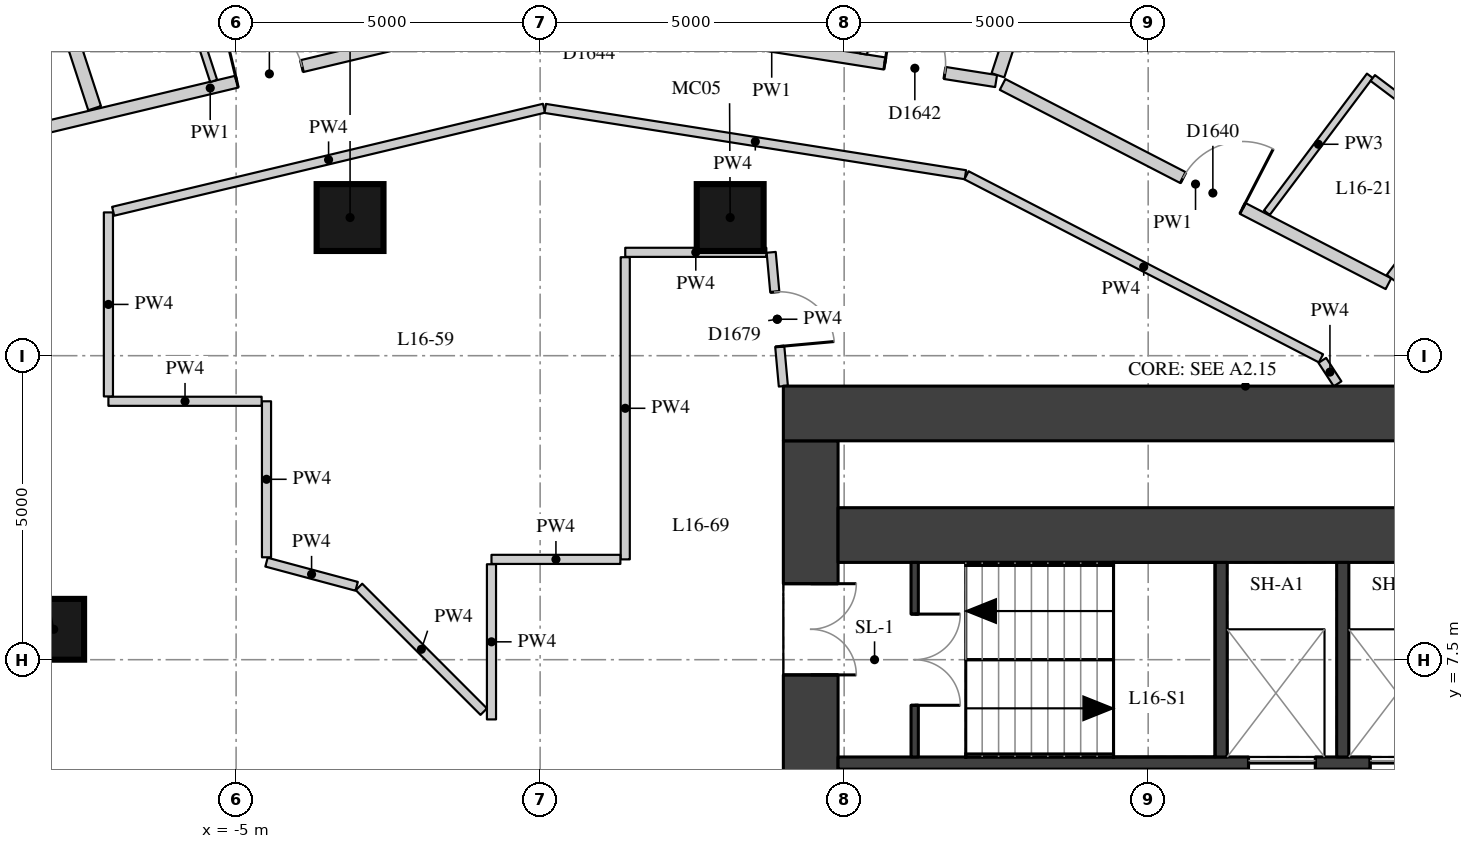
"""IFC4 building model, lengths in metres.
Left out: names, types, materials, properties, quantities, classifications, styles, units other than length and angle.
Written with IfcOpenShell. Run it as: python <this file> out.ifc"""

import sys

from ifc_helpers import new_model, si_unit, direction, frame, frame_2d, origin, origin_2d, place, context, subcontext, project, spatial, rectangle, extrude, element, fill, save


model = new_model("IFC4")
c1 = context("Model", 3, precision=1e-05, world=origin(), true_north=direction((0.0, 1.0)))
c2 = subcontext(c1, "Body", "Model", "MODEL_VIEW")
j1 = project(units=[si_unit("LENGTHUNIT", "METRE"), si_unit("PLANEANGLEUNIT", "RADIAN")], contexts=[c1])
p1 = place(None, origin())
s1 = spatial("IfcSite", under=j1, at=p1, CompositionType="ELEMENT")
p2 = place(p1, origin())
s2 = spatial("IfcBuilding", under=s1, at=p2, CompositionType="ELEMENT")
p3 = place(p2, frame((0.0, 0.0, 61.3)))
s3 = spatial("IfcBuildingStorey", under=s2, at=p3, CompositionType="ELEMENT", Elevation=61.3)
p4 = place(p3, frame((-8.0, 8.0, 0.0), z_axis=(0.0, 0.0, 1.0), x_axis=(1.0, 0.0, 0.0)))
e1 = element("IfcColumn", 1, at=p4, inside=s3, PredefinedType="COLUMN", context=c2, shape_type="SweptSolid", body=[
    extrude(rectangle(XDim=1.0, YDim=1.0, at=origin_2d()), origin(), (0.0, 0.0, 1.0), 3.3),
])
for number, where, z_axis, x_axis in (
    (2, (3.126, 14.772, 0.0), (0.0, 0.0, 1.0), (1.0, 0.0, 0.0)),
    (3, (-3.126, 14.772, 0.0), (0.0, 0.0, 1.0), (1.0, 0.0, 0.0)),
):
    element("IfcColumn", number, at=place(p3, frame(where, z_axis=z_axis, x_axis=x_axis)), inside=s3, PredefinedType="COLUMN", context=c2, shape_type="SweptSolid", body=[
        extrude(rectangle(XDim=1.1, YDim=1.1, at=origin_2d()), origin(), (0.0, 0.0, 1.0), 3.3),
    ])
p5 = place(p3, frame((4.45, -11.1, 0.0), z_axis=(0.0, 0.0, 1.0), x_axis=(0.0, 1.0, 0.0)))
e4 = element("IfcWall", 4, at=p5, inside=s3, PredefinedType="SHEAR", context=c2, shape_type="SweptSolid", body=[
    extrude(rectangle(XDim=22.2, YDim=0.9, at=frame_2d((11.1, 0.0))), origin(), (0.0, 0.0, 1.0), 3.02),
])
p6 = place(p5, frame((2.35, 0.0, 0.0)))
e5 = element("IfcOpeningElement", 5, at=p6, cuts=e4, PredefinedType="OPENING", context=c2, shape_type="SweptSolid", body=[
    extrude(rectangle(XDim=1.5, YDim=2.1, at=frame_2d((0.75, 1.05))), frame((0.0, 0.46, 0.0), z_axis=(0.0, -1.0, 0.0), x_axis=(1.0, 0.0, 0.0)), (0.0, 0.0, 1.0), 0.92),
])
p7 = place(p5, frame((5.45, 0.0, 0.0)))
e6 = element("IfcOpeningElement", 6, at=p7, cuts=e4, PredefinedType="OPENING", context=c2, shape_type="SweptSolid", body=[
    extrude(rectangle(XDim=1.8, YDim=2.1, at=frame_2d((0.9, 1.05))), frame((0.0, 0.46, 0.0), z_axis=(0.0, -1.0, 0.0), x_axis=(1.0, 0.0, 0.0)), (0.0, 0.0, 1.0), 0.92),
])
p8 = place(p5, frame((7.95, 0.0, 0.0)))
e7 = element("IfcOpeningElement", 7, at=p8, cuts=e4, PredefinedType="OPENING", context=c2, shape_type="SweptSolid", body=[
    extrude(rectangle(XDim=1.1, YDim=2.1, at=frame_2d((0.55, 1.05))), frame((0.0, 0.46, 0.0), z_axis=(0.0, -1.0, 0.0), x_axis=(1.0, 0.0, 0.0)), (0.0, 0.0, 1.0), 0.92),
])
p9 = place(p5, frame((10.6, 0.0, 0.0)))
e8 = element("IfcOpeningElement", 8, at=p9, cuts=e4, PredefinedType="OPENING", context=c2, shape_type="SweptSolid", body=[
    extrude(rectangle(XDim=1.0, YDim=2.1, at=frame_2d((0.5, 1.05))), frame((0.0, 0.46, 0.0), z_axis=(0.0, -1.0, 0.0), x_axis=(1.0, 0.0, 0.0)), (0.0, 0.0, 1.0), 0.92),
])
p10 = place(p5, frame((13.15, 0.0, 0.0)))
e9 = element("IfcOpeningElement", 9, at=p10, cuts=e4, PredefinedType="OPENING", context=c2, shape_type="SweptSolid", body=[
    extrude(rectangle(XDim=1.1, YDim=2.1, at=frame_2d((0.55, 1.05))), frame((0.0, 0.46, 0.0), z_axis=(0.0, -1.0, 0.0), x_axis=(1.0, 0.0, 0.0)), (0.0, 0.0, 1.0), 0.92),
])
p11 = place(p5, frame((14.95, 0.0, 0.0)))
e10 = element("IfcOpeningElement", 10, at=p11, cuts=e4, PredefinedType="OPENING", context=c2, shape_type="SweptSolid", body=[
    extrude(rectangle(XDim=1.8, YDim=2.1, at=frame_2d((0.9, 1.05))), frame((0.0, 0.46, 0.0), z_axis=(0.0, -1.0, 0.0), x_axis=(1.0, 0.0, 0.0)), (0.0, 0.0, 1.0), 0.92),
])
p12 = place(p5, frame((18.35, 0.0, 0.0)))
e11 = element("IfcOpeningElement", 11, at=p12, cuts=e4, PredefinedType="OPENING", context=c2, shape_type="SweptSolid", body=[
    extrude(rectangle(XDim=1.5, YDim=2.1, at=frame_2d((0.75, 1.05))), frame((0.0, 0.46, 0.0), z_axis=(0.0, -1.0, 0.0), x_axis=(1.0, 0.0, 0.0)), (0.0, 0.0, 1.0), 0.92),
])
p13 = place(p3, frame((4.0, 11.55, 0.0), z_axis=(0.0, 0.0, 1.0), x_axis=(1.0, 0.0, 0.0)))
e12 = element("IfcWall", 12, at=p13, inside=s3, PredefinedType="SHEAR", context=c2, shape_type="SweptSolid", body=[
    extrude(rectangle(XDim=15.2, YDim=0.9, at=frame_2d((7.6, 0.0))), origin(), (0.0, 0.0, 1.0), 3.02),
])
p14 = place(p3, frame((4.9, 9.55, 0.0), z_axis=(0.0, 0.0, 1.0), x_axis=(1.0, 0.0, 0.0)))
e13 = element("IfcWall", 13, at=p14, inside=s3, PredefinedType="SHEAR", context=c2, shape_type="SweptSolid", body=[
    extrude(rectangle(XDim=10.2, YDim=0.9, at=frame_2d((5.1, 0.0))), origin(), (0.0, 0.0, 1.0), 3.02),
])
p15 = place(p3, frame((4.9, 5.8, 0.0), z_axis=(0.0, 0.0, 1.0), x_axis=(1.0, 0.0, 0.0)))
e14 = element("IfcWall", 14, at=p15, inside=s3, PredefinedType="SHEAR", context=c2, shape_type="SweptSolid", body=[
    extrude(rectangle(XDim=10.2, YDim=0.2, at=frame_2d((5.1, 0.0))), origin(), (0.0, 0.0, 1.0), 3.02),
])
p16 = place(p15, frame((6.75, 0.0, 0.0)))
e15 = element("IfcOpeningElement", 15, at=p16, cuts=e14, PredefinedType="OPENING", context=c2, shape_type="SweptSolid", body=[
    extrude(rectangle(XDim=1.1, YDim=2.1, at=frame_2d((0.55, 1.05))), frame((0.0, 0.11, 0.0), z_axis=(0.0, -1.0, 0.0), x_axis=(1.0, 0.0, 0.0)), (0.0, 0.0, 1.0), 0.22),
])
p17 = place(p15, frame((8.75, 0.0, 0.0)))
e16 = element("IfcOpeningElement", 16, at=p17, cuts=e14, PredefinedType="OPENING", context=c2, shape_type="SweptSolid", body=[
    extrude(rectangle(XDim=1.1, YDim=2.1, at=frame_2d((0.55, 1.05))), frame((0.0, 0.11, 0.0), z_axis=(0.0, -1.0, 0.0), x_axis=(1.0, 0.0, 0.0)), (0.0, 0.0, 1.0), 0.22),
])
for number, where, z_axis, x_axis in (
    (17, (11.2, 5.9, 0.0), (0.0, 0.0, 1.0), (0.0, 1.0, 0.0)),
    (18, (13.2, 5.9, 0.0), (0.0, 0.0, 1.0), (0.0, 1.0, 0.0)),
):
    element("IfcWall", number, at=place(p3, frame(where, z_axis=z_axis, x_axis=x_axis)), inside=s3, PredefinedType="SHEAR", context=c2, shape_type="SweptSolid", body=[
        extrude(rectangle(XDim=3.2, YDim=0.2, at=frame_2d((1.6, 0.0))), origin(), (0.0, 0.0, 1.0), 3.02),
    ])
p18 = place(p3, frame((6.16, 5.9, 0.0), z_axis=(0.0, 0.0, 1.0), x_axis=(0.0, 1.0, 0.0)))
e19 = element("IfcWall", 19, at=p18, inside=s3, PredefinedType="SHEAR", context=c2, shape_type="SweptSolid", body=[
    extrude(rectangle(XDim=3.2, YDim=0.12, at=frame_2d((1.6, 0.0))), origin(), (0.0, 0.0, 1.0), 3.02),
])
p19 = place(p18, frame((0.85, 0.0, 0.0)))
e20 = element("IfcOpeningElement", 20, at=p19, cuts=e19, PredefinedType="OPENING", context=c2, shape_type="SweptSolid", body=[
    extrude(rectangle(XDim=1.5, YDim=2.1, at=frame_2d((0.75, 1.05))), frame((0.0, 0.07, 0.0), z_axis=(0.0, -1.0, 0.0), x_axis=(1.0, 0.0, 0.0)), (0.0, 0.0, 1.0), 0.14),
])
p20 = place(p3, frame((-10.852, 15.605, 0.0), z_axis=(0.0, 0.0, 1.0), x_axis=(0.972573296372, 0.232596610431, 0.0)))
e21 = element("IfcWall", 21, at=p20, inside=s3, PredefinedType="PARTITIONING", context=c2, shape_type="SweptSolid", body=[
    extrude(rectangle(XDim=11.157, YDim=0.2, at=frame_2d((5.579, 0.0))), origin(), (0.0, 0.0, 1.0), 3.02),
])
p21 = place(p20, frame((6.029, 0.0, 0.0)))
e22 = element("IfcOpeningElement", 22, at=p21, cuts=e21, PredefinedType="OPENING", context=c2, shape_type="SweptSolid", body=[
    extrude(rectangle(XDim=1.1, YDim=2.1, at=frame_2d((0.55, 1.05))), frame((0.0, 0.11, 0.0), z_axis=(0.0, -1.0, 0.0), x_axis=(1.0, 0.0, 0.0)), (0.0, 0.0, 1.0), 0.22),
])
p22 = place(p20, frame((0.705, 0.0, 0.0)))
e23 = element("IfcOpeningElement", 23, at=p22, cuts=e21, PredefinedType="OPENING", context=c2, shape_type="SweptSolid", body=[
    extrude(rectangle(XDim=1.0, YDim=2.1, at=frame_2d((0.5, 1.05))), frame((0.0, 0.11, 0.0), z_axis=(0.0, -1.0, 0.0), x_axis=(1.0, 0.0, 0.0)), (0.0, 0.0, 1.0), 0.22),
])
p23 = place(p3, frame((0.119, 18.181, 0.0), z_axis=(0.0, 0.0, 1.0), x_axis=(0.987788122462, -0.155803161464, 0.0)))
e24 = element("IfcWall", 24, at=p23, inside=s3, PredefinedType="PARTITIONING", context=c2, shape_type="SweptSolid", body=[
    extrude(rectangle(XDim=7.471, YDim=0.2, at=frame_2d((3.736, 0.0))), origin(), (0.0, 0.0, 1.0), 3.02),
])
p24 = place(p23, frame((5.619, 0.0, 0.0)))
e25 = element("IfcOpeningElement", 25, at=p24, cuts=e24, PredefinedType="OPENING", context=c2, shape_type="SweptSolid", body=[
    extrude(rectangle(XDim=1.0, YDim=2.1, at=frame_2d((0.5, 1.05))), frame((0.0, 0.11, 0.0), z_axis=(0.0, -1.0, 0.0), x_axis=(1.0, 0.0, 0.0)), (0.0, 0.0, 1.0), 0.22),
])
p25 = place(p23, frame((0.732, 0.0, 0.0)))
e26 = element("IfcOpeningElement", 26, at=p25, cuts=e24, PredefinedType="OPENING", context=c2, shape_type="SweptSolid", body=[
    extrude(rectangle(XDim=1.0, YDim=2.1, at=frame_2d((0.5, 1.05))), frame((0.0, 0.11, 0.0), z_axis=(0.0, -1.0, 0.0), x_axis=(1.0, 0.0, 0.0)), (0.0, 0.0, 1.0), 0.22),
])
p26 = place(p3, frame((7.606, 16.961, 0.0), z_axis=(0.0, 0.0, 1.0), x_axis=(0.888519518851, -0.45883882205, 0.0)))
e27 = element("IfcWall", 27, at=p26, inside=s3, PredefinedType="PARTITIONING", context=c2, shape_type="SweptSolid", body=[
    extrude(rectangle(XDim=7.142, YDim=0.2, at=frame_2d((3.571, 0.0))), origin(), (0.0, 0.0, 1.0), 3.02),
])
p27 = place(p26, frame((3.342, 0.0, 0.0)))
e28 = element("IfcOpeningElement", 28, at=p27, cuts=e27, PredefinedType="OPENING", context=c2, shape_type="SweptSolid", body=[
    extrude(rectangle(XDim=1.1, YDim=2.1, at=frame_2d((0.55, 1.05))), frame((0.0, 0.11, 0.0), z_axis=(0.0, -1.0, 0.0), x_axis=(1.0, 0.0, 0.0)), (0.0, 0.0, 1.0), 0.22),
])
p28 = place(p3, frame((4.0, 11.999, 0.0), z_axis=(0.0, 0.0, 1.0), x_axis=(-0.090475982725, 0.995898637689, 0.0)))
e29 = element("IfcWall", 29, at=p28, inside=s3, PredefinedType="PARTITIONING", context=c2, shape_type="SweptSolid", body=[
    extrude(rectangle(XDim=2.21, YDim=0.15, at=frame_2d((1.105, 0.0))), origin(), (0.0, 0.0, 1.0), 3.02),
])
p29 = place(p28, frame((0.655, 0.0, 0.0)))
e30 = element("IfcOpeningElement", 30, at=p29, cuts=e29, PredefinedType="OPENING", context=c2, shape_type="SweptSolid", body=[
    extrude(rectangle(XDim=0.9, YDim=2.1, at=frame_2d((0.45, 1.05))), frame((0.0, 0.085, 0.0), z_axis=(0.0, -1.0, 0.0), x_axis=(1.0, 0.0, 0.0)), (0.0, 0.0, 1.0), 0.17),
])
p30 = place(p3, frame((3.72, 14.2, 0.0), z_axis=(0.0, 0.0, 1.0), x_axis=(-1.0, 0.0, 0.0)))
e31 = element("IfcWall", 31, at=p30, inside=s3, PredefinedType="PARTITIONING", context=c2, shape_type="SweptSolid", body=[
    extrude(rectangle(XDim=2.32, YDim=0.15, at=frame_2d((1.16, 0.0))), origin(), (0.0, 0.0, 1.0), 3.02),
])
p31 = place(p3, frame((1.4, 14.12, 0.0), z_axis=(0.0, 0.0, 1.0), x_axis=(0.0, -1.0, 0.0)))
e32 = element("IfcWall", 32, at=p31, inside=s3, PredefinedType="PARTITIONING", context=c2, shape_type="SweptSolid", body=[
    extrude(rectangle(XDim=4.97, YDim=0.15, at=frame_2d((2.485, 0.0))), origin(), (0.0, 0.0, 1.0), 3.02),
])
p32 = place(p3, frame((1.32, 9.15, 0.0), z_axis=(0.0, 0.0, 1.0), x_axis=(-1.0, 0.0, 0.0)))
e33 = element("IfcWall", 33, at=p32, inside=s3, PredefinedType="PARTITIONING", context=c2, shape_type="SweptSolid", body=[
    extrude(rectangle(XDim=2.12, YDim=0.15, at=frame_2d((1.06, 0.0))), origin(), (0.0, 0.0, 1.0), 3.02),
])
p33 = place(p3, frame((-0.8, 9.07, 0.0), z_axis=(0.0, 0.0, 1.0), x_axis=(0.0, -1.0, 0.0)))
e34 = element("IfcWall", 34, at=p33, inside=s3, PredefinedType="PARTITIONING", context=c2, shape_type="SweptSolid", body=[
    extrude(rectangle(XDim=2.552, YDim=0.15, at=frame_2d((1.276, 0.0))), origin(), (0.0, 0.0, 1.0), 3.02),
])
p34 = place(p3, frame((-0.927, 6.645, 0.0), z_axis=(0.0, 0.0, 1.0), x_axis=(-0.707106781187, 0.707106781187, 0.0)))
e35 = element("IfcWall", 35, at=p34, inside=s3, PredefinedType="PARTITIONING", context=c2, shape_type="SweptSolid", body=[
    extrude(rectangle(XDim=2.901, YDim=0.15, at=frame_2d((1.451, 0.0))), origin(), (0.0, 0.0, 1.0), 3.02),
])
p35 = place(p3, frame((-3.018, 8.707, 0.0), z_axis=(0.0, 0.0, 1.0), x_axis=(-0.965925329025, 0.25882090091, 0.0)))
e36 = element("IfcWall", 36, at=p35, inside=s3, PredefinedType="PARTITIONING", context=c2, shape_type="SweptSolid", body=[
    extrude(rectangle(XDim=1.535, YDim=0.15, at=frame_2d((0.767, 0.0))), origin(), (0.0, 0.0, 1.0), 3.02),
])
p36 = place(p3, frame((-4.5, 9.184, 0.0), z_axis=(0.0, 0.0, 1.0), x_axis=(0.0, 1.0, 0.0)))
e37 = element("IfcWall", 37, at=p36, inside=s3, PredefinedType="PARTITIONING", context=c2, shape_type="SweptSolid", body=[
    extrude(rectangle(XDim=2.566, YDim=0.15, at=frame_2d((1.283, 0.0))), origin(), (0.0, 0.0, 1.0), 3.02),
])
p37 = place(p3, frame((-4.58, 11.75, 0.0), z_axis=(0.0, 0.0, 1.0), x_axis=(-1.0, 0.0, 0.0)))
e38 = element("IfcWall", 38, at=p37, inside=s3, PredefinedType="PARTITIONING", context=c2, shape_type="SweptSolid", body=[
    extrude(rectangle(XDim=2.52, YDim=0.15, at=frame_2d((1.26, 0.0))), origin(), (0.0, 0.0, 1.0), 3.02),
])
p38 = place(p3, frame((-7.1, 11.83, 0.0), z_axis=(0.0, 0.0, 1.0), x_axis=(0.0, 1.0, 0.0)))
e39 = element("IfcWall", 39, at=p38, inside=s3, PredefinedType="PARTITIONING", context=c2, shape_type="SweptSolid", body=[
    extrude(rectangle(XDim=3.027, YDim=0.15, at=frame_2d((1.513, 0.0))), origin(), (0.0, 0.0, 1.0), 3.02),
])
p39 = place(p3, frame((-7.022, 14.875, 0.0), z_axis=(0.0, 0.0, 1.0), x_axis=(0.972565872543, 0.232627650043, 0.0)))
e40 = element("IfcWall", 40, at=p39, inside=s3, PredefinedType="PARTITIONING", context=c2, shape_type="SweptSolid", body=[
    extrude(rectangle(XDim=7.286, YDim=0.15, at=frame_2d((3.643, 0.0))), origin(), (0.0, 0.0, 1.0), 3.02),
])
p40 = place(p3, frame((0.083, 16.567, 0.0), z_axis=(0.0, 0.0, 1.0), x_axis=(0.987781067139, -0.15584788546, 0.0)))
e41 = element("IfcWall", 41, at=p40, inside=s3, PredefinedType="PARTITIONING", context=c2, shape_type="SweptSolid", body=[
    extrude(rectangle(XDim=6.996, YDim=0.15, at=frame_2d((3.498, 0.0))), origin(), (0.0, 0.0, 1.0), 3.02),
])
p41 = place(p3, frame((7.012, 15.467, 0.0), z_axis=(0.0, 0.0, 1.0), x_axis=(0.888509096081, -0.458859004685, 0.0)))
e42 = element("IfcWall", 42, at=p41, inside=s3, PredefinedType="PARTITIONING", context=c2, shape_type="SweptSolid", body=[
    extrude(rectangle(XDim=6.561, YDim=0.15, at=frame_2d((3.281, 0.0))), origin(), (0.0, 0.0, 1.0), 3.02),
])
p42 = place(p3, frame((12.864, 12.423, 0.0), z_axis=(0.0, 0.0, 1.0), x_axis=(0.545733799108, -0.837958603101, 0.0)))
e43 = element("IfcWall", 43, at=p42, inside=s3, PredefinedType="PARTITIONING", context=c2, shape_type="SweptSolid", body=[
    extrude(rectangle(XDim=0.46, YDim=0.15, at=frame_2d((0.23, 0.0))), origin(), (0.0, 0.0, 1.0), 3.02),
])
p43 = place(p3, frame((16.927, 17.638, 0.0), z_axis=(0.0, 0.0, 1.0), x_axis=(-0.601159395391, -0.799129139334, 0.0)))
e44 = element("IfcWall", 44, at=p43, inside=s3, PredefinedType="PARTITIONING", context=c2, shape_type="SweptSolid", body=[
    extrude(rectangle(XDim=4.849, YDim=0.22, at=frame_2d((2.425, 0.0))), origin(), (0.0, 0.0, 1.0), 3.02),
])
p44 = place(p3, frame((9.034, 21.721, 0.0), z_axis=(0.0, 0.0, 1.0), x_axis=(-0.310330277344, -0.95062880188, 0.0)))
e45 = element("IfcWall", 45, at=p44, inside=s3, PredefinedType="PARTITIONING", context=c2, shape_type="SweptSolid", body=[
    extrude(rectangle(XDim=4.848, YDim=0.22, at=frame_2d((2.424, 0.0))), origin(), (0.0, 0.0, 1.0), 3.02),
])
p45 = place(p3, frame((-9.429, 23.014, 0.0), z_axis=(0.0, 0.0, 1.0), x_axis=(0.310223739243, -0.950663574357, 0.0)))
e46 = element("IfcWall", 46, at=p45, inside=s3, PredefinedType="PARTITIONING", context=c2, shape_type="SweptSolid", body=[
    extrude(rectangle(XDim=6.778, YDim=0.22, at=frame_2d((3.389, 0.0))), origin(), (0.0, 0.0, 1.0), 3.02),
])
p46 = place(p3, frame((11.952, 14.852, 0.0), z_axis=(0.0, 0.0, 1.0), x_axis=(0.60115003842, 0.7991361782, 0.0)))
e47 = element("IfcWall", 47, at=p46, inside=s3, PredefinedType="PARTITIONING", context=c2, shape_type="SweptSolid", body=[
    extrude(rectangle(XDim=2.818, YDim=0.12, at=frame_2d((1.409, 0.0))), origin(), (0.0, 0.0, 1.0), 3.02),
])
p47 = place(p3, frame((5.318, 17.462, 0.0), z_axis=(0.0, 0.0, 1.0), x_axis=(0.156077517275, 0.987744809453, 0.0)))
e48 = element("IfcWall", 48, at=p47, inside=s3, PredefinedType="PARTITIONING", context=c2, shape_type="SweptSolid", body=[
    extrude(rectangle(XDim=2.399, YDim=0.12, at=frame_2d((1.2, 0.0))), origin(), (0.0, 0.0, 1.0), 3.02),
])
p48 = place(p3, frame((-5.369, 17.019, 0.0), z_axis=(0.0, 0.0, 1.0), x_axis=(-0.310231838646, 0.950660931295, 0.0)))
e49 = element("IfcWall", 49, at=p48, inside=s3, PredefinedType="PARTITIONING", context=c2, shape_type="SweptSolid", body=[
    extrude(rectangle(XDim=2.861, YDim=0.12, at=frame_2d((1.431, 0.0))), origin(), (0.0, 0.0, 1.0), 3.02),
])
p49 = place(p3, frame((13.694, 17.067, 0.0), z_axis=(0.0, 0.0, 1.0), x_axis=(0.799118870394, -0.601173045786, 0.0)))
e50 = element("IfcWall", 50, at=p49, inside=s3, PredefinedType="PARTITIONING", context=c2, shape_type="SweptSolid", body=[
    extrude(rectangle(XDim=2.13, YDim=0.12, at=frame_2d((1.065, 0.0))), origin(), (0.0, 0.0, 1.0), 3.02),
])
p50 = place(p49, frame((0.59, 0.0, 0.0)))
e51 = element("IfcOpeningElement", 51, at=p50, cuts=e50, PredefinedType="OPENING", context=c2, shape_type="SweptSolid", body=[
    extrude(rectangle(XDim=1.0, YDim=2.1, at=frame_2d((0.5, 1.05))), frame((0.0, 0.07, 0.0), z_axis=(0.0, -1.0, 0.0), x_axis=(1.0, 0.0, 0.0)), (0.0, 0.0, 1.0), 0.14),
])
p51 = place(p12, origin())
e52 = element("IfcDoor", 52, at=p51, inside=s3, OperationType="DOUBLE_DOOR_SINGLE_SWING", PredefinedType="DOOR", context=c2, shape_type="SweptSolid", body=[
    extrude(rectangle(XDim=1.5, YDim=2.1, at=frame_2d((0.75, 1.05))), frame((0.0, 0.025, 0.0), z_axis=(0.0, -1.0, 0.0), x_axis=(1.0, 0.0, 0.0)), (0.0, 0.0, 1.0), 0.05),
])
fill(e11, e52)
p52 = place(p19, origin())
e53 = element("IfcDoor", 53, at=p52, inside=s3, OperationType="DOUBLE_DOOR_SINGLE_SWING", PredefinedType="DOOR", context=c2, shape_type="SweptSolid", body=[
    extrude(rectangle(XDim=1.5, YDim=2.1, at=frame_2d((0.75, 1.05))), frame((0.0, 0.025, 0.0), z_axis=(0.0, -1.0, 0.0), x_axis=(1.0, 0.0, 0.0)), (0.0, 0.0, 1.0), 0.05),
])
fill(e20, e53)
p53 = place(p16, origin())
e54 = element("IfcDoor", 54, at=p53, inside=s3, OperationType="DOUBLE_DOOR_SLIDING", PredefinedType="DOOR", context=c2, shape_type="SweptSolid", body=[
    extrude(rectangle(XDim=1.1, YDim=2.1, at=frame_2d((0.55, 1.05))), frame((0.0, 0.025, 0.0), z_axis=(0.0, -1.0, 0.0), x_axis=(1.0, 0.0, 0.0)), (0.0, 0.0, 1.0), 0.05),
])
fill(e15, e54)
p54 = place(p17, origin())
e55 = element("IfcDoor", 55, at=p54, inside=s3, OperationType="DOUBLE_DOOR_SLIDING", PredefinedType="DOOR", context=c2, shape_type="SweptSolid", body=[
    extrude(rectangle(XDim=1.1, YDim=2.1, at=frame_2d((0.55, 1.05))), frame((0.0, 0.025, 0.0), z_axis=(0.0, -1.0, 0.0), x_axis=(1.0, 0.0, 0.0)), (0.0, 0.0, 1.0), 0.05),
])
fill(e16, e55)
p55 = place(p27, origin())
e56 = element("IfcDoor", 56, at=p55, inside=s3, OperationType="SINGLE_SWING_RIGHT", PredefinedType="DOOR", context=c2, shape_type="SweptSolid", body=[
    extrude(rectangle(XDim=1.1, YDim=2.1, at=frame_2d((0.55, 1.05))), frame((0.0, 0.025, 0.0), z_axis=(0.0, -1.0, 0.0), x_axis=(1.0, 0.0, 0.0)), (0.0, 0.0, 1.0), 0.05),
])
fill(e28, e56)
p56 = place(p24, origin())
e57 = element("IfcDoor", 57, at=p56, inside=s3, OperationType="SINGLE_SWING_LEFT", PredefinedType="DOOR", context=c2, shape_type="SweptSolid", body=[
    extrude(rectangle(XDim=1.0, YDim=2.1, at=frame_2d((0.5, 1.05))), frame((0.0, 0.025, 0.0), z_axis=(0.0, -1.0, 0.0), x_axis=(1.0, 0.0, 0.0)), (0.0, 0.0, 1.0), 0.05),
])
fill(e25, e57)
p57 = place(p21, origin())
e58 = element("IfcDoor", 58, at=p57, inside=s3, OperationType="SINGLE_SWING_LEFT", PredefinedType="DOOR", context=c2, shape_type="SweptSolid", body=[
    extrude(rectangle(XDim=1.1, YDim=2.1, at=frame_2d((0.55, 1.05))), frame((0.0, 0.025, 0.0), z_axis=(0.0, -1.0, 0.0), x_axis=(1.0, 0.0, 0.0)), (0.0, 0.0, 1.0), 0.05),
])
fill(e22, e58)
p58 = place(p29, origin())
e59 = element("IfcDoor", 59, at=p58, inside=s3, OperationType="SINGLE_SWING_RIGHT", PredefinedType="DOOR", context=c2, shape_type="SweptSolid", body=[
    extrude(rectangle(XDim=0.9, YDim=2.1, at=frame_2d((0.45, 1.05))), frame((0.0, 0.025, 0.0), z_axis=(0.0, -1.0, 0.0), x_axis=(1.0, 0.0, 0.0)), (0.0, 0.0, 1.0), 0.05),
])
fill(e30, e59)
save(model, sys.argv[1])
